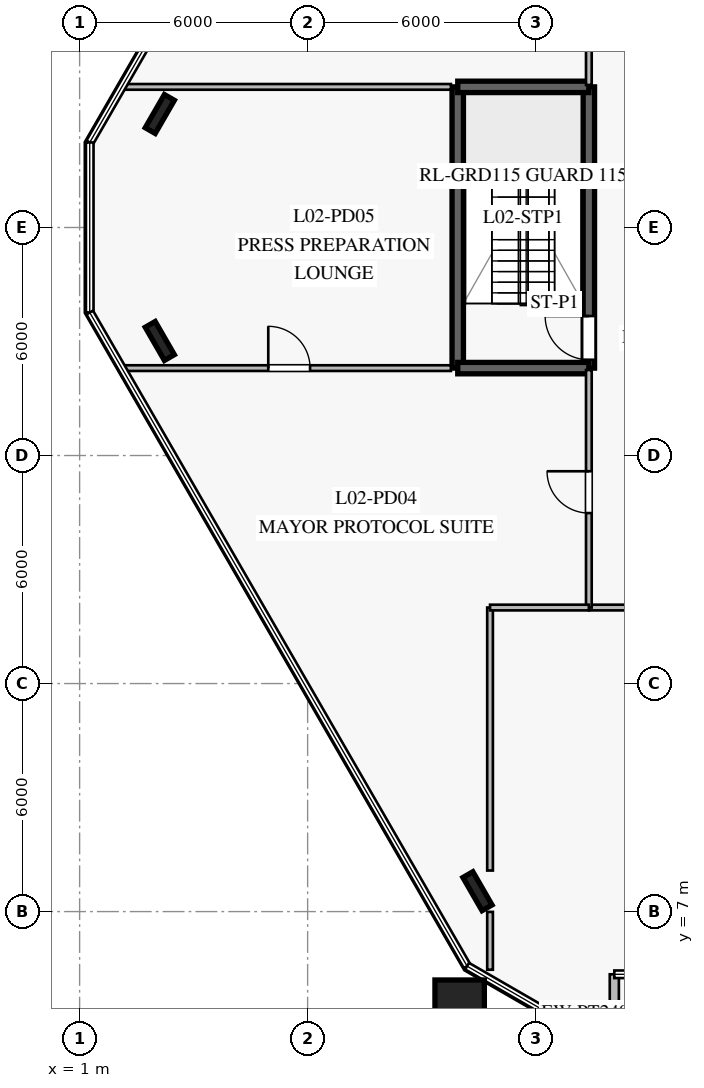
"""IFC4 building model, lengths in metres.
Left out: names, types, materials, properties, quantities, classifications, styles, units other than length and angle.
Written with IfcOpenShell. Run it as: python <this file> out.ifc"""

import sys

from ifc_helpers import new_model, si_unit, direction, frame, frame_2d, origin, origin_2d, place, context, subcontext, project, spatial, rectangle, i_section, extrude, element, fill, save


model = new_model("IFC4")
c1 = context("Model", 3, precision=1e-05, world=origin(), true_north=direction((0.0, 1.0)))
c2 = subcontext(c1, "Body", "Model", "MODEL_VIEW")
j1 = project(units=[si_unit("LENGTHUNIT", "METRE"), si_unit("PLANEANGLEUNIT", "RADIAN")], contexts=[c1])
p1 = place(None, origin())
s1 = spatial("IfcSite", under=j1, at=p1, CompositionType="ELEMENT")
p2 = place(p1, origin())
s2 = spatial("IfcBuilding", under=s1, at=p2, CompositionType="ELEMENT")
p3 = place(p2, frame((0.0, 0.0, 9.8)))
s3 = spatial("IfcBuildingStorey", under=s2, at=p3, CompositionType="ELEMENT", Elevation=9.8)
p4 = place(p3, frame((14.4, 21.3, 0.0), z_axis=(0.0, 0.0, 1.0), x_axis=(0.0, 1.0, 0.0)))
e1 = element("IfcWall", 1, at=p4, inside=s3, PredefinedType="SOLIDWALL", context=c2, shape_type="SweptSolid", body=[
    extrude(rectangle(XDim=7.4, YDim=0.3, at=frame_2d((3.7, 0.0))), origin(), (0.0, 0.0, 1.0), 4.34),
])
p5 = place(p4, frame((0.22, 0.0, 0.0)))
e2 = element("IfcOpeningElement", 2, at=p5, cuts=e1, PredefinedType="OPENING", context=c2, shape_type="SweptSolid", body=[
    extrude(rectangle(XDim=1.15, YDim=2.2, at=frame_2d((0.575, 1.1))), frame((0.0, 0.16, 0.0), z_axis=(0.0, -1.0, 0.0), x_axis=(1.0, 0.0, 0.0)), (0.0, 0.0, 1.0), 0.32),
])
p6 = place(p3, frame((10.95, 21.3, 0.0), z_axis=(0.0, 0.0, 1.0), x_axis=(0.0, 1.0, 0.0)))
e3 = element("IfcWall", 3, at=p6, inside=s3, PredefinedType="SOLIDWALL", context=c2, shape_type="SweptSolid", body=[
    extrude(rectangle(XDim=7.4, YDim=0.3, at=frame_2d((3.7, 0.0))), origin(), (0.0, 0.0, 1.0), 4.34),
])
for number, where, z_axis, x_axis in (
    (4, (10.95, 21.3, 0.0), (0.0, 0.0, 1.0), (1.0, 0.0, 0.0)),
    (5, (10.95, 28.7, 0.0), (0.0, 0.0, 1.0), (1.0, 0.0, 0.0)),
):
    element("IfcWall", number, at=place(p3, frame(where, z_axis=z_axis, x_axis=x_axis)), inside=s3, PredefinedType="SOLIDWALL", context=c2, shape_type="SweptSolid", body=[
        extrude(rectangle(XDim=3.45, YDim=0.3, at=frame_2d((1.725, 0.0))), origin(), (0.0, 0.0, 1.0), 4.34),
    ])
for number, where, z_axis, x_axis in (
    (6, (3.11, 27.986, 0.0), (0.0, 0.0, 1.0), (0.5, 0.866, 0.0)),
    (7, (3.11, 22.014, 0.0), (0.0, 0.0, 1.0), (-0.5, 0.866, 0.0)),
    (8, (11.469, 7.536, 0.0), (0.0, 0.0, 1.0), (-0.5, 0.866, 0.0)),
):
    element("IfcColumn", number, at=place(p3, frame(where, z_axis=z_axis, x_axis=x_axis)), inside=s3, PredefinedType="COLUMN", context=c2, shape_type="SweptSolid", body=[
        extrude(i_section(OverallWidth=0.302, OverallDepth=1.008, WebThickness=0.021, FlangeThickness=0.04, at=origin_2d()), origin(), (0.0, 0.0, 1.0), 4.6),
    ])
p7 = place(p3, frame((11.0, 4.55, 0.0), z_axis=(0.0, 0.0, 1.0), x_axis=(1.0, 0.0, 0.0)))
e9 = element("IfcColumn", 9, at=p7, inside=s3, PredefinedType="COLUMN", context=c2, shape_type="SweptSolid", body=[
    extrude(rectangle(XDim=1.3, YDim=1.3, at=origin_2d()), origin(), (0.0, 0.0, 1.0), 4.6),
])
p8 = place(p3, frame((15.07, 3.327, 0.0), z_axis=(0.0, 0.0, 1.0), x_axis=(0.0, 1.0, 0.0)))
e10 = element("IfcWall", 10, at=p8, inside=s3, PredefinedType="STANDARD", context=c2, shape_type="SweptSolid", body=[
    extrude(rectangle(XDim=2.023, YDim=0.24, at=frame_2d((1.012, 0.0))), origin(), (0.0, 0.0, 1.0), 4.34),
])
p9 = place(p3, frame((14.4, 15.0, 0.0), z_axis=(0.0, 0.0, 1.0), x_axis=(1.0, 0.0, 0.0)))
e11 = element("IfcWall", 11, at=p9, inside=s3, PredefinedType="PARTITIONING", context=c2, shape_type="SweptSolid", body=[
    extrude(rectangle(XDim=21.2, YDim=0.15, at=frame_2d((10.6, 0.0))), origin(), (0.0, 0.0, 1.0), 3.79),
])
p10 = place(p9, frame((9.5, 0.0, 0.0)))
e12 = element("IfcOpeningElement", 12, at=p10, cuts=e11, PredefinedType="OPENING", context=c2, shape_type="SweptSolid", body=[
    extrude(rectangle(XDim=2.2, YDim=2.4, at=frame_2d((1.1, 1.2))), frame((0.0, 0.085, 0.0), z_axis=(0.0, -1.0, 0.0), x_axis=(1.0, 0.0, 0.0)), (0.0, 0.0, 1.0), 0.17),
])
p11 = place(p3, frame((14.4, 15.0, 0.0), z_axis=(0.0, 0.0, 1.0), x_axis=(0.0, 1.0, 0.0)))
e13 = element("IfcWall", 13, at=p11, inside=s3, PredefinedType="PARTITIONING", context=c2, shape_type="SweptSolid", body=[
    extrude(rectangle(XDim=6.25, YDim=0.15, at=frame_2d((3.125, 0.0))), origin(), (0.0, 0.0, 1.0), 3.79),
])
p12 = place(p11, frame((2.486, 0.0, 0.0)))
e14 = element("IfcOpeningElement", 14, at=p12, cuts=e13, PredefinedType="OPENING", context=c2, shape_type="SweptSolid", body=[
    extrude(rectangle(XDim=1.1, YDim=2.2, at=frame_2d((0.55, 1.1))), frame((0.0, 0.085, 0.0), z_axis=(0.0, -1.0, 0.0), x_axis=(1.0, 0.0, 0.0)), (0.0, 0.0, 1.0), 0.17),
])
p13 = place(p3, frame((14.4, 28.75, 0.0), z_axis=(0.0, 0.0, 1.0), x_axis=(0.0, 1.0, 0.0)))
e15 = element("IfcWall", 15, at=p13, inside=s3, PredefinedType="PARTITIONING", context=c2, shape_type="SweptSolid", body=[
    extrude(rectangle(XDim=6.25, YDim=0.15, at=frame_2d((3.125, 0.0))), origin(), (0.0, 0.0, 1.0), 4.34),
])
p14 = place(p3, frame((11.8, 5.47, 0.0), z_axis=(0.0, 0.0, 1.0), x_axis=(0.0, 1.0, 0.0)))
e16 = element("IfcWall", 16, at=p14, inside=s3, PredefinedType="PARTITIONING", context=c2, shape_type="SweptSolid", body=[
    extrude(rectangle(XDim=1.522, YDim=0.15, at=frame_2d((0.761, 0.0))), origin(), (0.0, 0.0, 1.0), 3.79),
])
p15 = place(p3, frame((11.8, 8.08, 0.0), z_axis=(0.0, 0.0, 1.0), x_axis=(0.0, 1.0, 0.0)))
e17 = element("IfcWall", 17, at=p15, inside=s3, PredefinedType="PARTITIONING", context=c2, shape_type="SweptSolid", body=[
    extrude(rectangle(XDim=6.92, YDim=0.15, at=frame_2d((3.46, 0.0))), origin(), (0.0, 0.0, 1.0), 3.79),
])
p16 = place(p3, frame((11.8, 15.0, 0.0), z_axis=(0.0, 0.0, 1.0), x_axis=(1.0, 0.0, 0.0)))
e18 = element("IfcWall", 18, at=p16, inside=s3, PredefinedType="PARTITIONING", context=c2, shape_type="SweptSolid", body=[
    extrude(rectangle(XDim=2.6, YDim=0.15, at=frame_2d((1.3, 0.0))), origin(), (0.0, 0.0, 1.0), 4.34),
])
p17 = place(p3, frame((2.08, 21.3, 0.0), z_axis=(0.0, 0.0, 1.0), x_axis=(1.0, 0.0, 0.0)))
e19 = element("IfcWall", 19, at=p17, inside=s3, PredefinedType="PARTITIONING", context=c2, shape_type="SweptSolid", body=[
    extrude(rectangle(XDim=8.69, YDim=0.15, at=frame_2d((4.345, 0.0))), origin(), (0.0, 0.0, 1.0), 3.64),
])
p18 = place(p17, frame((3.884, 0.0, 0.0)))
e20 = element("IfcOpeningElement", 20, at=p18, cuts=e19, PredefinedType="OPENING", context=c2, shape_type="SweptSolid", body=[
    extrude(rectangle(XDim=1.1, YDim=2.2, at=frame_2d((0.55, 1.1))), frame((0.0, 0.085, 0.0), z_axis=(0.0, -1.0, 0.0), x_axis=(1.0, 0.0, 0.0)), (0.0, 0.0, 1.0), 0.17),
])
p19 = place(p3, frame((2.08, 28.7, 0.0), z_axis=(0.0, 0.0, 1.0), x_axis=(1.0, 0.0, 0.0)))
e21 = element("IfcWall", 21, at=p19, inside=s3, PredefinedType="PARTITIONING", context=c2, shape_type="SweptSolid", body=[
    extrude(rectangle(XDim=8.69, YDim=0.15, at=frame_2d((4.345, 0.0))), origin(), (0.0, 0.0, 1.0), 3.64),
])
p20 = place(p5, origin())
e22 = element("IfcDoor", 22, at=p20, inside=s3, OperationType="SINGLE_SWING_RIGHT", PredefinedType="DOOR", context=c2, shape_type="SweptSolid", body=[
    extrude(rectangle(XDim=1.15, YDim=2.2, at=frame_2d((0.575, 1.1))), frame((0.0, 0.025, 0.0), z_axis=(0.0, -1.0, 0.0), x_axis=(1.0, 0.0, 0.0)), (0.0, 0.0, 1.0), 0.05),
])
fill(e2, e22)
p21 = place(p12, origin())
e23 = element("IfcDoor", 23, at=p21, inside=s3, OperationType="SINGLE_SWING_RIGHT", PredefinedType="DOOR", context=c2, shape_type="SweptSolid", body=[
    extrude(rectangle(XDim=1.1, YDim=2.2, at=frame_2d((0.55, 1.1))), frame((0.0, 0.025, 0.0), z_axis=(0.0, -1.0, 0.0), x_axis=(1.0, 0.0, 0.0)), (0.0, 0.0, 1.0), 0.05),
])
fill(e14, e23)
p22 = place(p18, origin())
e24 = element("IfcDoor", 24, at=p22, inside=s3, OperationType="SINGLE_SWING_LEFT", PredefinedType="DOOR", context=c2, shape_type="SweptSolid", body=[
    extrude(rectangle(XDim=1.1, YDim=2.2, at=frame_2d((0.55, 1.1))), frame((0.0, 0.025, 0.0), z_axis=(0.0, -1.0, 0.0), x_axis=(1.0, 0.0, 0.0)), (0.0, 0.0, 1.0), 0.05),
])
fill(e20, e24)
save(model, sys.argv[1])
